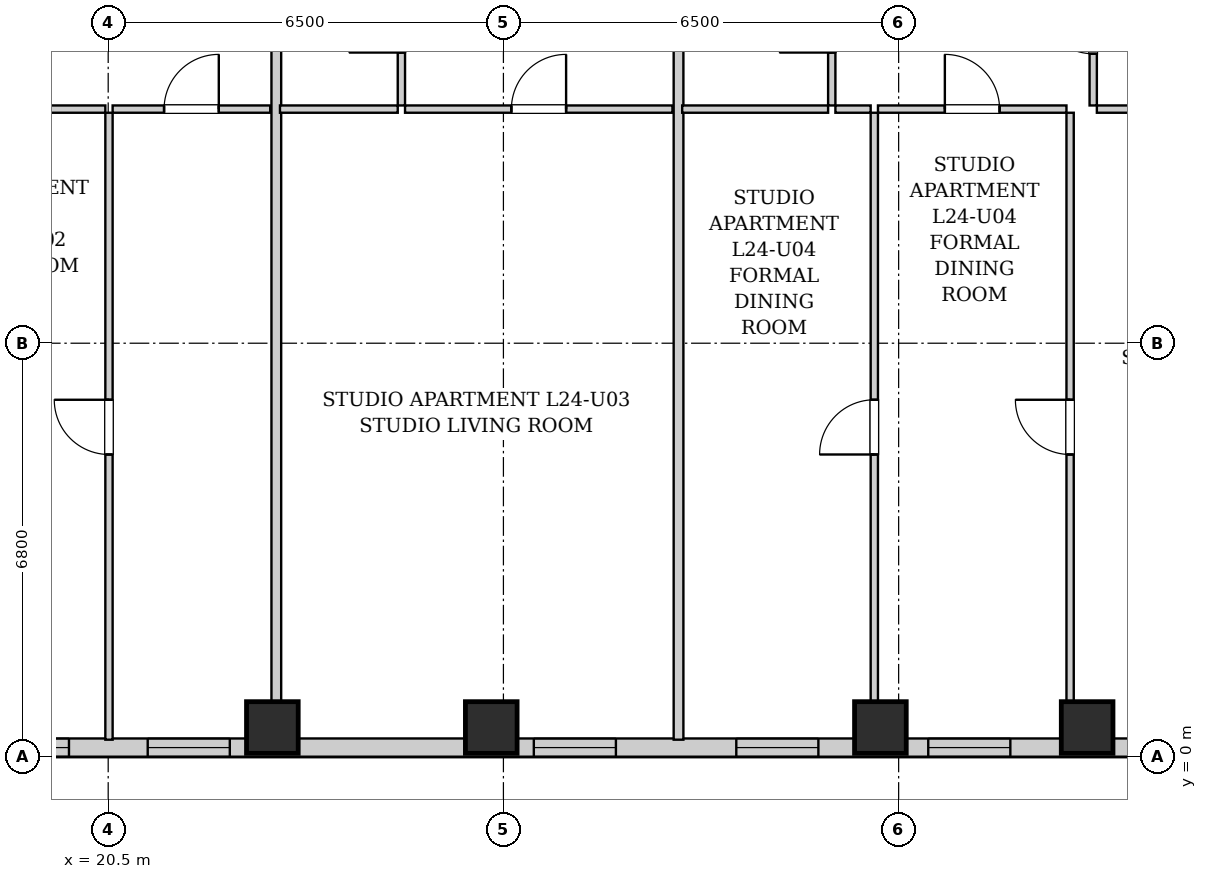
"""IFC4 building model, lengths in metres.
Left out: names, types, materials, properties, quantities, classifications, styles, units other than length and angle.
Written with IfcOpenShell. Run it as: python <this file> out.ifc"""

import sys

from ifc_helpers import new_model, si_unit, direction, frame, frame_2d, origin, origin_2d, place, context, subcontext, project, spatial, rectangle, extrude, element, fill, save


model = new_model("IFC4")
c1 = context("Model", 3, precision=1e-05, world=origin(), true_north=direction((0.0, 1.0)))
c2 = subcontext(c1, "Body", "Model", "MODEL_VIEW")
j1 = project(units=[si_unit("LENGTHUNIT", "METRE"), si_unit("PLANEANGLEUNIT", "RADIAN")], contexts=[c1])
p1 = place(None, origin())
s1 = spatial("IfcSite", under=j1, at=p1, CompositionType="ELEMENT")
p2 = place(p1, origin())
s2 = spatial("IfcBuilding", under=s1, at=p2, CompositionType="ELEMENT")
p3 = place(p2, frame((0.0, 0.0, 87.9)))
s3 = spatial("IfcBuildingStorey", under=s2, at=p3, CompositionType="ELEMENT", Elevation=87.9)
for number, where, z_axis, x_axis in (
    (1, (23.2, 0.48, 0.0), (0.0, 0.0, 1.0), (1.0, 0.0, 0.0)),
    (2, (26.8, 0.48, 0.0), (0.0, 0.0, 1.0), (1.0, 0.0, 0.0)),
    (3, (33.2, 0.48, 0.0), (0.0, 0.0, 1.0), (1.0, 0.0, 0.0)),
    (4, (36.6, 0.48, 0.0), (0.0, 0.0, 1.0), (1.0, 0.0, 0.0)),
):
    element("IfcColumn", number, at=place(p3, frame(where, z_axis=z_axis, x_axis=x_axis)), inside=s3, PredefinedType="COLUMN", context=c2, shape_type="SweptSolid", body=[
        extrude(rectangle(XDim=0.85, YDim=0.85, at=origin_2d()), origin(), (0.0, 0.0, 1.0), 3.2),
    ])
p4 = place(p3, frame((40.9, 0.15, 0.0), z_axis=(0.0, 0.0, 1.0), x_axis=(-1.0, 0.0, 0.0)))
e5 = element("IfcWall", 5, at=p4, inside=s3, PredefinedType="SOLIDWALL", context=c2, shape_type="SweptSolid", body=[
    extrude(rectangle(XDim=23.9, YDim=0.3, at=frame_2d((11.95, 0.0))), origin(), (0.0, 0.0, 1.0), 2.94),
])
p5 = place(p4, frame((21.045, 0.0, 0.55)))
e6 = element("IfcOpeningElement", 6, at=p5, cuts=e5, PredefinedType="OPENING", context=c2, shape_type="SweptSolid", body=[
    extrude(rectangle(XDim=1.35, YDim=1.2, at=frame_2d((0.675, 0.6))), frame((0.0, 0.16, 0.0), z_axis=(0.0, -1.0, 0.0), x_axis=(1.0, 0.0, 0.0)), (0.0, 0.0, 1.0), 0.32),
])
p6 = place(p4, frame((18.4, 0.0, 0.55)))
e7 = element("IfcOpeningElement", 7, at=p6, cuts=e5, PredefinedType="OPENING", context=c2, shape_type="SweptSolid", body=[
    extrude(rectangle(XDim=1.35, YDim=1.2, at=frame_2d((0.675, 0.6))), frame((0.0, 0.16, 0.0), z_axis=(0.0, -1.0, 0.0), x_axis=(1.0, 0.0, 0.0)), (0.0, 0.0, 1.0), 0.32),
])
p7 = place(p4, frame((12.05, 0.0, 0.55)))
e8 = element("IfcOpeningElement", 8, at=p7, cuts=e5, PredefinedType="OPENING", context=c2, shape_type="SweptSolid", body=[
    extrude(rectangle(XDim=1.35, YDim=1.2, at=frame_2d((0.675, 0.6))), frame((0.0, 0.16, 0.0), z_axis=(0.0, -1.0, 0.0), x_axis=(1.0, 0.0, 0.0)), (0.0, 0.0, 1.0), 0.32),
])
p8 = place(p4, frame((8.72, 0.0, 0.55)))
e9 = element("IfcOpeningElement", 9, at=p8, cuts=e5, PredefinedType="OPENING", context=c2, shape_type="SweptSolid", body=[
    extrude(rectangle(XDim=1.35, YDim=1.2, at=frame_2d((0.675, 0.6))), frame((0.0, 0.16, 0.0), z_axis=(0.0, -1.0, 0.0), x_axis=(1.0, 0.0, 0.0)), (0.0, 0.0, 1.0), 0.32),
])
p9 = place(p4, frame((5.563, 0.0, 0.55)))
e10 = element("IfcOpeningElement", 10, at=p9, cuts=e5, PredefinedType="OPENING", context=c2, shape_type="SweptSolid", body=[
    extrude(rectangle(XDim=1.35, YDim=1.2, at=frame_2d((0.675, 0.6))), frame((0.0, 0.16, 0.0), z_axis=(0.0, -1.0, 0.0), x_axis=(1.0, 0.0, 0.0)), (0.0, 0.0, 1.0), 0.32),
])
p10 = place(p3, frame((19.38, 10.65, 0.0), z_axis=(0.0, 0.0, 1.0), x_axis=(1.0, 0.0, 0.0)))
e11 = element("IfcWall", 11, at=p10, inside=s3, PredefinedType="PARTITIONING", context=c2, shape_type="SweptSolid", body=[
    extrude(rectangle(XDim=1.073, YDim=0.12, at=frame_2d((0.537, 0.0))), origin(), (0.0, 0.0, 1.0), 2.94),
])
p11 = place(p3, frame((20.573, 10.65, 0.0), z_axis=(0.0, 0.0, 1.0), x_axis=(1.0, 0.0, 0.0)))
e12 = element("IfcWall", 12, at=p11, inside=s3, PredefinedType="PARTITIONING", context=c2, shape_type="SweptSolid", body=[
    extrude(rectangle(XDim=2.592, YDim=0.12, at=frame_2d((1.296, 0.0))), origin(), (0.0, 0.0, 1.0), 2.94),
])
p12 = place(p11, frame((0.846, 0.0, 0.0)))
e13 = element("IfcOpeningElement", 13, at=p12, cuts=e12, PredefinedType="OPENING", context=c2, shape_type="SweptSolid", body=[
    extrude(rectangle(XDim=0.9, YDim=2.05, at=frame_2d((0.45, 1.025))), frame((0.0, 0.07, 0.0), z_axis=(0.0, -1.0, 0.0), x_axis=(1.0, 0.0, 0.0)), (0.0, 0.0, 1.0), 0.14),
])
p13 = place(p3, frame((20.513, 0.28, 0.0), z_axis=(0.0, 0.0, 1.0), x_axis=(0.0, 1.0, 0.0)))
e14 = element("IfcWall", 14, at=p13, inside=s3, PredefinedType="PARTITIONING", context=c2, shape_type="SweptSolid", body=[
    extrude(rectangle(XDim=10.31, YDim=0.12, at=frame_2d((5.155, 0.0))), origin(), (0.0, 0.0, 1.0), 2.94),
])
p14 = place(p13, frame((4.69, 0.0, 0.0)))
e15 = element("IfcOpeningElement", 15, at=p14, cuts=e14, PredefinedType="OPENING", context=c2, shape_type="SweptSolid", body=[
    extrude(rectangle(XDim=0.9, YDim=2.05, at=frame_2d((0.45, 1.025))), frame((0.0, 0.07, 0.0), z_axis=(0.0, -1.0, 0.0), x_axis=(1.0, 0.0, 0.0)), (0.0, 0.0, 1.0), 0.14),
])
p15 = place(p3, frame((23.265, 0.28, 0.0), z_axis=(0.0, 0.0, 1.0), x_axis=(0.0, 1.0, 0.0)))
e16 = element("IfcWall", 16, at=p15, inside=s3, PredefinedType="PARTITIONING", context=c2, shape_type="SweptSolid", body=[
    extrude(rectangle(XDim=13.03, YDim=0.16, at=frame_2d((6.515, 0.0))), origin(), (0.0, 0.0, 1.0), 2.94),
])
p16 = place(p3, frame((25.322, 10.71, 0.0), z_axis=(0.0, 0.0, 1.0), x_axis=(0.0, 1.0, 0.0)))
e17 = element("IfcWall", 17, at=p16, inside=s3, PredefinedType="PARTITIONING", context=c2, shape_type="SweptSolid", body=[
    extrude(rectangle(XDim=2.6, YDim=0.12, at=frame_2d((1.3, 0.0))), origin(), (0.0, 0.0, 1.0), 2.94),
])
p17 = place(p16, frame((0.87, 0.0, 0.0)))
e18 = element("IfcOpeningElement", 18, at=p17, cuts=e17, PredefinedType="OPENING", context=c2, shape_type="SweptSolid", body=[
    extrude(rectangle(XDim=0.86, YDim=2.05, at=frame_2d((0.43, 1.025))), frame((0.0, 0.07, 0.0), z_axis=(0.0, -1.0, 0.0), x_axis=(1.0, 0.0, 0.0)), (0.0, 0.0, 1.0), 0.14),
])
p18 = place(p3, frame((23.325, 10.65, 0.0), z_axis=(0.0, 0.0, 1.0), x_axis=(1.0, 0.0, 0.0)))
e19 = element("IfcWall", 19, at=p18, inside=s3, PredefinedType="PARTITIONING", context=c2, shape_type="SweptSolid", body=[
    extrude(rectangle(XDim=1.937, YDim=0.12, at=frame_2d((0.969, 0.0))), origin(), (0.0, 0.0, 1.0), 2.94),
])
p19 = place(p3, frame((25.382, 10.65, 0.0), z_axis=(0.0, 0.0, 1.0), x_axis=(1.0, 0.0, 0.0)))
e20 = element("IfcWall", 20, at=p19, inside=s3, PredefinedType="PARTITIONING", context=c2, shape_type="SweptSolid", body=[
    extrude(rectangle(XDim=4.398, YDim=0.12, at=frame_2d((2.199, 0.0))), origin(), (0.0, 0.0, 1.0), 2.94),
])
p20 = place(p19, frame((1.749, 0.0, 0.0)))
e21 = element("IfcOpeningElement", 21, at=p20, cuts=e20, PredefinedType="OPENING", context=c2, shape_type="SweptSolid", body=[
    extrude(rectangle(XDim=0.9, YDim=2.05, at=frame_2d((0.45, 1.025))), frame((0.0, 0.07, 0.0), z_axis=(0.0, -1.0, 0.0), x_axis=(1.0, 0.0, 0.0)), (0.0, 0.0, 1.0), 0.14),
])
p21 = place(p3, frame((29.88, 0.28, 0.0), z_axis=(0.0, 0.0, 1.0), x_axis=(0.0, 1.0, 0.0)))
e22 = element("IfcWall", 22, at=p21, inside=s3, PredefinedType="PARTITIONING", context=c2, shape_type="SweptSolid", body=[
    extrude(rectangle(XDim=13.03, YDim=0.16, at=frame_2d((6.515, 0.0))), origin(), (0.0, 0.0, 1.0), 2.94),
])
p22 = place(p3, frame((32.4, 10.71, 0.0), z_axis=(0.0, 0.0, 1.0), x_axis=(0.0, 1.0, 0.0)))
e23 = element("IfcWall", 23, at=p22, inside=s3, PredefinedType="PARTITIONING", context=c2, shape_type="SweptSolid", body=[
    extrude(rectangle(XDim=2.6, YDim=0.12, at=frame_2d((1.3, 0.0))), origin(), (0.0, 0.0, 1.0), 2.94),
])
p23 = place(p22, frame((0.87, 0.0, 0.0)))
e24 = element("IfcOpeningElement", 24, at=p23, cuts=e23, PredefinedType="OPENING", context=c2, shape_type="SweptSolid", body=[
    extrude(rectangle(XDim=0.86, YDim=2.05, at=frame_2d((0.43, 1.025))), frame((0.0, 0.07, 0.0), z_axis=(0.0, -1.0, 0.0), x_axis=(1.0, 0.0, 0.0)), (0.0, 0.0, 1.0), 0.14),
])
p24 = place(p3, frame((29.94, 10.65, 0.0), z_axis=(0.0, 0.0, 1.0), x_axis=(1.0, 0.0, 0.0)))
e25 = element("IfcWall", 25, at=p24, inside=s3, PredefinedType="PARTITIONING", context=c2, shape_type="SweptSolid", body=[
    extrude(rectangle(XDim=2.4, YDim=0.12, at=frame_2d((1.2, 0.0))), origin(), (0.0, 0.0, 1.0), 2.94),
])
p25 = place(p3, frame((36.7, 10.71, 0.0), z_axis=(0.0, 0.0, 1.0), x_axis=(0.0, 1.0, 0.0)))
e26 = element("IfcWall", 26, at=p25, inside=s3, PredefinedType="PARTITIONING", context=c2, shape_type="SweptSolid", body=[
    extrude(rectangle(XDim=2.6, YDim=0.12, at=frame_2d((1.3, 0.0))), origin(), (0.0, 0.0, 1.0), 2.94),
])
p26 = place(p25, frame((0.85, 0.0, 0.0)))
e27 = element("IfcOpeningElement", 27, at=p26, cuts=e26, PredefinedType="OPENING", context=c2, shape_type="SweptSolid", body=[
    extrude(rectangle(XDim=0.9, YDim=2.05, at=frame_2d((0.45, 1.025))), frame((0.0, 0.07, 0.0), z_axis=(0.0, -1.0, 0.0), x_axis=(1.0, 0.0, 0.0)), (0.0, 0.0, 1.0), 0.14),
])
p27 = place(p3, frame((32.46, 10.65, 0.0), z_axis=(0.0, 0.0, 1.0), x_axis=(1.0, 0.0, 0.0)))
e28 = element("IfcWall", 28, at=p27, inside=s3, PredefinedType="PARTITIONING", context=c2, shape_type="SweptSolid", body=[
    extrude(rectangle(XDim=0.58, YDim=0.12, at=frame_2d((0.29, 0.0))), origin(), (0.0, 0.0, 1.0), 2.94),
])
p28 = place(p3, frame((33.16, 10.65, 0.0), z_axis=(0.0, 0.0, 1.0), x_axis=(1.0, 0.0, 0.0)))
e29 = element("IfcWall", 29, at=p28, inside=s3, PredefinedType="PARTITIONING", context=c2, shape_type="SweptSolid", body=[
    extrude(rectangle(XDim=3.1, YDim=0.12, at=frame_2d((1.55, 0.0))), origin(), (0.0, 0.0, 1.0), 2.94),
])
p29 = place(p28, frame((1.1, 0.0, 0.0)))
e30 = element("IfcOpeningElement", 30, at=p29, cuts=e29, PredefinedType="OPENING", context=c2, shape_type="SweptSolid", body=[
    extrude(rectangle(XDim=0.9, YDim=2.05, at=frame_2d((0.45, 1.025))), frame((0.0, 0.07, 0.0), z_axis=(0.0, -1.0, 0.0), x_axis=(1.0, 0.0, 0.0)), (0.0, 0.0, 1.0), 0.14),
])
p30 = place(p3, frame((36.76, 10.65, 0.0), z_axis=(0.0, 0.0, 1.0), x_axis=(1.0, 0.0, 0.0)))
e31 = element("IfcWall", 31, at=p30, inside=s3, PredefinedType="PARTITIONING", context=c2, shape_type="SweptSolid", body=[
    extrude(rectangle(XDim=4.06, YDim=0.12, at=frame_2d((2.03, 0.0))), origin(), (0.0, 0.0, 1.0), 2.94),
])
p31 = place(p30, frame((1.58, 0.0, 0.0)))
e32 = element("IfcOpeningElement", 32, at=p31, cuts=e31, PredefinedType="OPENING", context=c2, shape_type="SweptSolid", body=[
    extrude(rectangle(XDim=0.9, YDim=2.05, at=frame_2d((0.45, 1.025))), frame((0.0, 0.07, 0.0), z_axis=(0.0, -1.0, 0.0), x_axis=(1.0, 0.0, 0.0)), (0.0, 0.0, 1.0), 0.14),
])
p32 = place(p3, frame((33.1, 0.28, 0.0), z_axis=(0.0, 0.0, 1.0), x_axis=(0.0, 1.0, 0.0)))
e33 = element("IfcWall", 33, at=p32, inside=s3, PredefinedType="PARTITIONING", context=c2, shape_type="SweptSolid", body=[
    extrude(rectangle(XDim=10.31, YDim=0.12, at=frame_2d((5.155, 0.0))), origin(), (0.0, 0.0, 1.0), 2.309),
])
p33 = place(p32, frame((4.69, 0.0, 0.0)))
e34 = element("IfcOpeningElement", 34, at=p33, cuts=e33, PredefinedType="OPENING", context=c2, shape_type="SweptSolid", body=[
    extrude(rectangle(XDim=0.9, YDim=2.05, at=frame_2d((0.45, 1.025))), frame((0.0, 0.07, 0.0), z_axis=(0.0, -1.0, 0.0), x_axis=(1.0, 0.0, 0.0)), (0.0, 0.0, 1.0), 0.14),
])
p34 = place(p3, frame((36.32, 0.28, 0.0), z_axis=(0.0, 0.0, 1.0), x_axis=(0.0, 1.0, 0.0)))
e35 = element("IfcWall", 35, at=p34, inside=s3, PredefinedType="PARTITIONING", context=c2, shape_type="SweptSolid", body=[
    extrude(rectangle(XDim=10.31, YDim=0.12, at=frame_2d((5.155, 0.0))), origin(), (0.0, 0.0, 1.0), 2.94),
])
p35 = place(p34, frame((4.69, 0.0, 0.0)))
e36 = element("IfcOpeningElement", 36, at=p35, cuts=e35, PredefinedType="OPENING", context=c2, shape_type="SweptSolid", body=[
    extrude(rectangle(XDim=0.9, YDim=2.05, at=frame_2d((0.45, 1.025))), frame((0.0, 0.07, 0.0), z_axis=(0.0, -1.0, 0.0), x_axis=(1.0, 0.0, 0.0)), (0.0, 0.0, 1.0), 0.14),
])
p36 = place(p12, origin())
e37 = element("IfcDoor", 37, at=p36, inside=s3, OperationType="SINGLE_SWING_RIGHT", PredefinedType="DOOR", context=c2, shape_type="SweptSolid", body=[
    extrude(rectangle(XDim=0.9, YDim=2.05, at=frame_2d((0.45, 1.025))), frame((0.0, 0.025, 0.0), z_axis=(0.0, -1.0, 0.0), x_axis=(1.0, 0.0, 0.0)), (0.0, 0.0, 1.0), 0.05),
])
fill(e13, e37)
p37 = place(p14, origin())
e38 = element("IfcDoor", 38, at=p37, inside=s3, OperationType="SINGLE_SWING_RIGHT", PredefinedType="DOOR", context=c2, shape_type="SweptSolid", body=[
    extrude(rectangle(XDim=0.9, YDim=2.05, at=frame_2d((0.45, 1.025))), frame((0.0, 0.025, 0.0), z_axis=(0.0, -1.0, 0.0), x_axis=(1.0, 0.0, 0.0)), (0.0, 0.0, 1.0), 0.05),
])
fill(e15, e38)
p38 = place(p17, origin())
e39 = element("IfcDoor", 39, at=p38, inside=s3, OperationType="SINGLE_SWING_LEFT", PredefinedType="DOOR", context=c2, shape_type="SweptSolid", body=[
    extrude(rectangle(XDim=0.86, YDim=2.05, at=frame_2d((0.43, 1.025))), frame((0.0, 0.025, 0.0), z_axis=(0.0, -1.0, 0.0), x_axis=(1.0, 0.0, 0.0)), (0.0, 0.0, 1.0), 0.05),
])
fill(e18, e39)
p39 = place(p20, origin())
e40 = element("IfcDoor", 40, at=p39, inside=s3, OperationType="SINGLE_SWING_RIGHT", PredefinedType="DOOR", context=c2, shape_type="SweptSolid", body=[
    extrude(rectangle(XDim=0.9, YDim=2.05, at=frame_2d((0.45, 1.025))), frame((0.0, 0.025, 0.0), z_axis=(0.0, -1.0, 0.0), x_axis=(1.0, 0.0, 0.0)), (0.0, 0.0, 1.0), 0.05),
])
fill(e21, e40)
p40 = place(p23, origin())
e41 = element("IfcDoor", 41, at=p40, inside=s3, OperationType="SINGLE_SWING_LEFT", PredefinedType="DOOR", context=c2, shape_type="SweptSolid", body=[
    extrude(rectangle(XDim=0.86, YDim=2.05, at=frame_2d((0.43, 1.025))), frame((0.0, 0.025, 0.0), z_axis=(0.0, -1.0, 0.0), x_axis=(1.0, 0.0, 0.0)), (0.0, 0.0, 1.0), 0.05),
])
fill(e24, e41)
p41 = place(p26, origin())
e42 = element("IfcDoor", 42, at=p41, inside=s3, OperationType="SINGLE_SWING_RIGHT", PredefinedType="DOOR", context=c2, shape_type="SweptSolid", body=[
    extrude(rectangle(XDim=0.9, YDim=2.05, at=frame_2d((0.45, 1.025))), frame((0.0, 0.025, 0.0), z_axis=(0.0, -1.0, 0.0), x_axis=(1.0, 0.0, 0.0)), (0.0, 0.0, 1.0), 0.05),
])
fill(e27, e42)
p42 = place(p29, origin())
e43 = element("IfcDoor", 43, at=p42, inside=s3, OperationType="SINGLE_SWING_LEFT", PredefinedType="DOOR", context=c2, shape_type="SweptSolid", body=[
    extrude(rectangle(XDim=0.9, YDim=2.05, at=frame_2d((0.45, 1.025))), frame((0.0, 0.025, 0.0), z_axis=(0.0, -1.0, 0.0), x_axis=(1.0, 0.0, 0.0)), (0.0, 0.0, 1.0), 0.05),
])
fill(e30, e43)
p43 = place(p33, origin())
e44 = element("IfcDoor", 44, at=p43, inside=s3, OperationType="SINGLE_SWING_LEFT", PredefinedType="DOOR", context=c2, shape_type="SweptSolid", body=[
    extrude(rectangle(XDim=0.9, YDim=2.05, at=frame_2d((0.45, 1.025))), frame((0.0, 0.025, 0.0), z_axis=(0.0, -1.0, 0.0), x_axis=(1.0, 0.0, 0.0)), (0.0, 0.0, 1.0), 0.05),
])
fill(e34, e44)
p44 = place(p35, origin())
e45 = element("IfcDoor", 45, at=p44, inside=s3, OperationType="SINGLE_SWING_RIGHT", PredefinedType="DOOR", context=c2, shape_type="SweptSolid", body=[
    extrude(rectangle(XDim=0.9, YDim=2.05, at=frame_2d((0.45, 1.025))), frame((0.0, 0.025, 0.0), z_axis=(0.0, -1.0, 0.0), x_axis=(1.0, 0.0, 0.0)), (0.0, 0.0, 1.0), 0.05),
])
fill(e36, e45)
p45 = place(p5, origin())
e46 = element("IfcWindow", 46, at=p45, inside=s3, PartitioningType="SINGLE_PANEL", PredefinedType="WINDOW", context=c2, shape_type="SweptSolid", body=[
    extrude(rectangle(XDim=1.35, YDim=1.2, at=frame_2d((0.675, 0.6))), frame((0.0, 0.03, 0.0), z_axis=(0.0, -1.0, 0.0), x_axis=(1.0, 0.0, 0.0)), (0.0, 0.0, 1.0), 0.06),
])
fill(e6, e46)
p46 = place(p6, origin())
e47 = element("IfcWindow", 47, at=p46, inside=s3, PartitioningType="SINGLE_PANEL", PredefinedType="WINDOW", context=c2, shape_type="SweptSolid", body=[
    extrude(rectangle(XDim=1.35, YDim=1.2, at=frame_2d((0.675, 0.6))), frame((0.0, 0.03, 0.0), z_axis=(0.0, -1.0, 0.0), x_axis=(1.0, 0.0, 0.0)), (0.0, 0.0, 1.0), 0.06),
])
fill(e7, e47)
p47 = place(p7, origin())
e48 = element("IfcWindow", 48, at=p47, inside=s3, PartitioningType="SINGLE_PANEL", PredefinedType="WINDOW", context=c2, shape_type="SweptSolid", body=[
    extrude(rectangle(XDim=1.35, YDim=1.2, at=frame_2d((0.675, 0.6))), frame((0.0, 0.03, 0.0), z_axis=(0.0, -1.0, 0.0), x_axis=(1.0, 0.0, 0.0)), (0.0, 0.0, 1.0), 0.06),
])
fill(e8, e48)
p48 = place(p8, origin())
e49 = element("IfcWindow", 49, at=p48, inside=s3, PartitioningType="SINGLE_PANEL", PredefinedType="WINDOW", context=c2, shape_type="SweptSolid", body=[
    extrude(rectangle(XDim=1.35, YDim=1.2, at=frame_2d((0.675, 0.6))), frame((0.0, 0.03, 0.0), z_axis=(0.0, -1.0, 0.0), x_axis=(1.0, 0.0, 0.0)), (0.0, 0.0, 1.0), 0.06),
])
fill(e9, e49)
p49 = place(p9, origin())
e50 = element("IfcWindow", 50, at=p49, inside=s3, PartitioningType="SINGLE_PANEL", PredefinedType="WINDOW", context=c2, shape_type="SweptSolid", body=[
    extrude(rectangle(XDim=1.35, YDim=1.2, at=frame_2d((0.675, 0.6))), frame((0.0, 0.03, 0.0), z_axis=(0.0, -1.0, 0.0), x_axis=(1.0, 0.0, 0.0)), (0.0, 0.0, 1.0), 0.06),
])
fill(e10, e50)
save(model, sys.argv[1])
